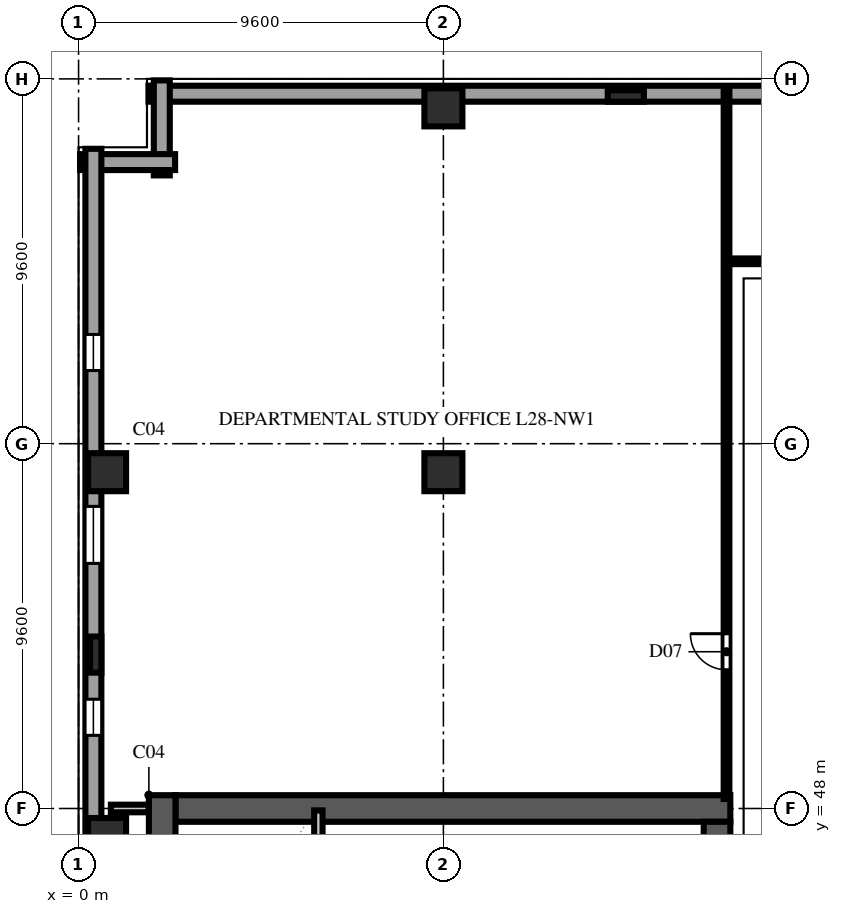
"""IFC4 building model, lengths in metres.
Left out: names, types, materials, properties, quantities, classifications, styles, units other than length and angle.
Written with IfcOpenShell. Run it as: python <this file> out.ifc"""

import sys

from ifc_helpers import new_model, si_unit, direction, frame, frame_2d, origin, origin_2d, place, context, subcontext, project, spatial, rectangle, extrude, element, fill, save


model = new_model("IFC4")
c1 = context("Model", 3, precision=1e-05, world=origin(), true_north=direction((0.0, 1.0)))
c2 = subcontext(c1, "Body", "Model", "MODEL_VIEW")
j1 = project(units=[si_unit("LENGTHUNIT", "METRE"), si_unit("PLANEANGLEUNIT", "RADIAN")], contexts=[c1])
p1 = place(None, origin())
s1 = spatial("IfcSite", under=j1, at=p1, CompositionType="ELEMENT")
p2 = place(p1, origin())
s2 = spatial("IfcBuilding", under=s1, at=p2, CompositionType="ELEMENT")
p3 = place(p2, frame((0.0, 0.0, 112.8)))
s3 = spatial("IfcBuildingStorey", under=s2, at=p3, CompositionType="ELEMENT", Elevation=112.8)
p4 = place(p3, frame((2.55, 48.0, 0.0), z_axis=(0.0, 0.0, 1.0), x_axis=(1.0, 0.0, 0.0)))
e1 = element("IfcWall", 1, at=p4, inside=s3, PredefinedType="SHEAR", context=c2, shape_type="SweptSolid", body=[
    extrude(rectangle(XDim=14.6, YDim=0.7, at=frame_2d((7.3, 0.0))), origin(), (0.0, 0.0, 1.0), 3.54),
])
p5 = place(p3, frame((2.2, 9.25, 0.0), z_axis=(0.0, 0.0, 1.0), x_axis=(0.0, 1.0, 0.0)))
e2 = element("IfcWall", 2, at=p5, inside=s3, PredefinedType="SHEAR", context=c2, shape_type="SweptSolid", body=[
    extrude(rectangle(XDim=39.1, YDim=0.7, at=frame_2d((19.55, 0.0))), origin(), (0.0, 0.0, 1.0), 3.54),
])
p6 = place(p3, frame((16.8, 36.4, 0.0), z_axis=(0.0, 0.0, 1.0), x_axis=(0.0, 1.0, 0.0)))
e3 = element("IfcWall", 3, at=p6, inside=s3, PredefinedType="SHEAR", context=c2, shape_type="SweptSolid", body=[
    extrude(rectangle(XDim=11.25, YDim=0.7, at=frame_2d((5.625, 0.0))), origin(), (0.0, 0.0, 1.0), 3.54),
])
p7 = place(p6, frame((9.2, 0.0, 0.0)))
e4 = element("IfcOpeningElement", 4, at=p7, cuts=e3, PredefinedType="OPENING", context=c2, shape_type="SweptSolid", body=[
    extrude(rectangle(XDim=0.95, YDim=2.15, at=frame_2d((0.475, 1.075))), frame((0.0, 0.362, 0.0), z_axis=(0.0, -1.0, 0.0), x_axis=(1.0, 0.0, 0.0)), (0.0, 0.0, 1.0), 0.724),
])
for number, where, z_axis, x_axis in (
    (5, (0.75, 47.25, 0.0), (0.0, 0.0, 1.0), (1.0, 0.0, 0.0)),
    (6, (0.75, 56.85, 0.0), (0.0, 0.0, 1.0), (1.0, 0.0, 0.0)),
    (7, (9.6, 56.85, 0.0), (0.0, 0.0, 1.0), (1.0, 0.0, 0.0)),
    (8, (9.6, 66.45, 0.0), (0.0, 0.0, 1.0), (1.0, 0.0, 0.0)),
):
    element("IfcColumn", number, at=place(p3, frame(where, z_axis=z_axis, x_axis=x_axis)), inside=s3, PredefinedType="COLUMN", context=c2, shape_type="SweptSolid", body=[
        extrude(rectangle(XDim=1.0, YDim=1.0, at=origin_2d()), origin(), (0.0, 0.0, 1.0), 3.8),
    ])
for number, where, z_axis, x_axis in (
    (9, (0.45, 52.05, 0.0), (0.0, 0.0, 1.0), (0.0, 1.0, 0.0)),
    (10, (14.4, 66.75, 0.0), (0.0, 0.0, 1.0), (1.0, 0.0, 0.0)),
):
    element("IfcColumn", number, at=place(p3, frame(where, z_axis=z_axis, x_axis=x_axis)), inside=s3, PredefinedType="PILASTER", context=c2, shape_type="SweptSolid", body=[
        extrude(rectangle(XDim=0.95, YDim=0.3, at=origin_2d()), origin(), (0.0, 0.0, 1.0), 3.8),
    ])
p8 = place(p3, frame((36.56, 66.81, 0.0), z_axis=(0.0, 0.0, 1.0), x_axis=(-1.0, 0.0, 0.0)))
e11 = element("IfcWall", 11, at=p8, inside=s3, PredefinedType="SOLIDWALL", context=c2, shape_type="SweptSolid", body=[
    extrude(rectangle(XDim=34.72, YDim=0.42, at=frame_2d((17.36, 0.0))), origin(), (0.0, 0.0, 1.0), 3.54),
])
p9 = place(p8, frame((4.885, 0.0, 0.9)))
e12 = element("IfcOpeningElement", 12, at=p9, cuts=e11, PredefinedType="OPENING", context=c2, shape_type="SweptSolid", body=[
    extrude(rectangle(XDim=0.95, YDim=1.85, at=frame_2d((0.475, 0.925))), frame((0.0, 0.222, 0.0), z_axis=(0.0, -1.0, 0.0), x_axis=(1.0, 0.0, 0.0)), (0.0, 0.0, 1.0), 0.444),
])
p10 = place(p8, frame((9.41, 0.0, 0.9)))
e13 = element("IfcOpeningElement", 13, at=p10, cuts=e11, PredefinedType="OPENING", context=c2, shape_type="SweptSolid", body=[
    extrude(rectangle(XDim=1.5, YDim=1.85, at=frame_2d((0.75, 0.925))), frame((0.0, 0.222, 0.0), z_axis=(0.0, -1.0, 0.0), x_axis=(1.0, 0.0, 0.0)), (0.0, 0.0, 1.0), 0.444),
])
p11 = place(p8, frame((14.485, 0.0, 0.9)))
e14 = element("IfcOpeningElement", 14, at=p11, cuts=e11, PredefinedType="OPENING", context=c2, shape_type="SweptSolid", body=[
    extrude(rectangle(XDim=0.95, YDim=1.85, at=frame_2d((0.475, 0.925))), frame((0.0, 0.222, 0.0), z_axis=(0.0, -1.0, 0.0), x_axis=(1.0, 0.0, 0.0)), (0.0, 0.0, 1.0), 0.444),
])
for number, where, z_axis, x_axis in (
    (15, (2.19, 67.16, 0.0), (0.0, 0.0, 1.0), (0.0, -1.0, 0.0)),
    (16, (2.54, 65.01, 0.0), (0.0, 0.0, 1.0), (-1.0, 0.0, 0.0)),
):
    element("IfcWall", number, at=place(p3, frame(where, z_axis=z_axis, x_axis=x_axis)), inside=s3, PredefinedType="SOLIDWALL", context=c2, shape_type="SweptSolid", body=[
        extrude(rectangle(XDim=2.5, YDim=0.42, at=frame_2d((1.25, 0.0))), origin(), (0.0, 0.0, 1.0), 3.54),
    ])
p12 = place(p3, frame((0.39, 65.36, 0.0), z_axis=(0.0, 0.0, 1.0), x_axis=(0.0, -1.0, 0.0)))
e17 = element("IfcWall", 17, at=p12, inside=s3, PredefinedType="SOLIDWALL", context=c2, shape_type="SweptSolid", body=[
    extrude(rectangle(XDim=63.52, YDim=0.42, at=frame_2d((31.76, 0.0))), origin(), (0.0, 0.0, 1.0), 3.54),
])
p13 = place(p12, frame((4.885, 0.0, 0.9)))
e18 = element("IfcOpeningElement", 18, at=p13, cuts=e17, PredefinedType="OPENING", context=c2, shape_type="SweptSolid", body=[
    extrude(rectangle(XDim=0.95, YDim=1.85, at=frame_2d((0.475, 0.925))), frame((0.0, 0.222, 0.0), z_axis=(0.0, -1.0, 0.0), x_axis=(1.0, 0.0, 0.0)), (0.0, 0.0, 1.0), 0.444),
])
p14 = place(p12, frame((9.41, 0.0, 0.9)))
e19 = element("IfcOpeningElement", 19, at=p14, cuts=e17, PredefinedType="OPENING", context=c2, shape_type="SweptSolid", body=[
    extrude(rectangle(XDim=1.5, YDim=1.85, at=frame_2d((0.75, 0.925))), frame((0.0, 0.222, 0.0), z_axis=(0.0, -1.0, 0.0), x_axis=(1.0, 0.0, 0.0)), (0.0, 0.0, 1.0), 0.444),
])
p15 = place(p12, frame((14.485, 0.0, 0.9)))
e20 = element("IfcOpeningElement", 20, at=p15, cuts=e17, PredefinedType="OPENING", context=c2, shape_type="SweptSolid", body=[
    extrude(rectangle(XDim=0.95, YDim=1.85, at=frame_2d((0.475, 0.925))), frame((0.0, 0.222, 0.0), z_axis=(0.0, -1.0, 0.0), x_axis=(1.0, 0.0, 0.0)), (0.0, 0.0, 1.0), 0.444),
])
p16 = place(p12, frame((19.01, 0.0, 0.9)))
e21 = element("IfcOpeningElement", 21, at=p16, cuts=e17, PredefinedType="OPENING", context=c2, shape_type="SweptSolid", body=[
    extrude(rectangle(XDim=1.5, YDim=1.85, at=frame_2d((0.75, 0.925))), frame((0.0, 0.222, 0.0), z_axis=(0.0, -1.0, 0.0), x_axis=(1.0, 0.0, 0.0)), (0.0, 0.0, 1.0), 0.444),
])
p17 = place(p12, frame((24.085, 0.0, 0.9)))
e22 = element("IfcOpeningElement", 22, at=p17, cuts=e17, PredefinedType="OPENING", context=c2, shape_type="SweptSolid", body=[
    extrude(rectangle(XDim=0.95, YDim=1.85, at=frame_2d((0.475, 0.925))), frame((0.0, 0.222, 0.0), z_axis=(0.0, -1.0, 0.0), x_axis=(1.0, 0.0, 0.0)), (0.0, 0.0, 1.0), 0.444),
])
p18 = place(p12, frame((28.61, 0.0, 0.9)))
e23 = element("IfcOpeningElement", 23, at=p18, cuts=e17, PredefinedType="OPENING", context=c2, shape_type="SweptSolid", body=[
    extrude(rectangle(XDim=1.5, YDim=1.85, at=frame_2d((0.75, 0.925))), frame((0.0, 0.222, 0.0), z_axis=(0.0, -1.0, 0.0), x_axis=(1.0, 0.0, 0.0)), (0.0, 0.0, 1.0), 0.444),
])
p19 = place(p12, frame((33.685, 0.0, 0.9)))
e24 = element("IfcOpeningElement", 24, at=p19, cuts=e17, PredefinedType="OPENING", context=c2, shape_type="SweptSolid", body=[
    extrude(rectangle(XDim=0.95, YDim=1.85, at=frame_2d((0.475, 0.925))), frame((0.0, 0.222, 0.0), z_axis=(0.0, -1.0, 0.0), x_axis=(1.0, 0.0, 0.0)), (0.0, 0.0, 1.0), 0.444),
])
p20 = place(p12, frame((38.21, 0.0, 0.9)))
e25 = element("IfcOpeningElement", 25, at=p20, cuts=e17, PredefinedType="OPENING", context=c2, shape_type="SweptSolid", body=[
    extrude(rectangle(XDim=1.5, YDim=1.85, at=frame_2d((0.75, 0.925))), frame((0.0, 0.222, 0.0), z_axis=(0.0, -1.0, 0.0), x_axis=(1.0, 0.0, 0.0)), (0.0, 0.0, 1.0), 0.444),
])
p21 = place(p12, frame((43.285, 0.0, 0.9)))
e26 = element("IfcOpeningElement", 26, at=p21, cuts=e17, PredefinedType="OPENING", context=c2, shape_type="SweptSolid", body=[
    extrude(rectangle(XDim=0.95, YDim=1.85, at=frame_2d((0.475, 0.925))), frame((0.0, 0.222, 0.0), z_axis=(0.0, -1.0, 0.0), x_axis=(1.0, 0.0, 0.0)), (0.0, 0.0, 1.0), 0.444),
])
p22 = place(p12, frame((47.81, 0.0, 0.9)))
e27 = element("IfcOpeningElement", 27, at=p22, cuts=e17, PredefinedType="OPENING", context=c2, shape_type="SweptSolid", body=[
    extrude(rectangle(XDim=1.5, YDim=1.85, at=frame_2d((0.75, 0.925))), frame((0.0, 0.222, 0.0), z_axis=(0.0, -1.0, 0.0), x_axis=(1.0, 0.0, 0.0)), (0.0, 0.0, 1.0), 0.444),
])
p23 = place(p12, frame((52.885, 0.0, 0.9)))
e28 = element("IfcOpeningElement", 28, at=p23, cuts=e17, PredefinedType="OPENING", context=c2, shape_type="SweptSolid", body=[
    extrude(rectangle(XDim=0.95, YDim=1.85, at=frame_2d((0.475, 0.925))), frame((0.0, 0.222, 0.0), z_axis=(0.0, -1.0, 0.0), x_axis=(1.0, 0.0, 0.0)), (0.0, 0.0, 1.0), 0.444),
])
p24 = place(p12, frame((57.41, 0.0, 0.9)))
e29 = element("IfcOpeningElement", 29, at=p24, cuts=e17, PredefinedType="OPENING", context=c2, shape_type="SweptSolid", body=[
    extrude(rectangle(XDim=1.5, YDim=1.85, at=frame_2d((0.75, 0.925))), frame((0.0, 0.222, 0.0), z_axis=(0.0, -1.0, 0.0), x_axis=(1.0, 0.0, 0.0)), (0.0, 0.0, 1.0), 0.444),
])
p25 = place(p3, frame((6.31, 40.14, 0.0), z_axis=(0.0, 0.0, 1.0), x_axis=(0.0, 1.0, 0.0)))
e30 = element("IfcWall", 30, at=p25, inside=s3, PredefinedType="SOLIDWALL", context=c2, shape_type="SweptSolid", body=[
    extrude(rectangle(XDim=7.81, YDim=0.22, at=frame_2d((3.905, 0.0))), origin(), (0.0, 0.0, 1.0), 3.54),
])
p26 = place(p3, frame((0.85, 48.0, 0.0), z_axis=(0.0, 0.0, 1.0), x_axis=(1.0, 0.0, 0.0)))
e31 = element("IfcWall", 31, at=p26, inside=s3, PredefinedType="SOLIDWALL", context=c2, shape_type="SweptSolid", body=[
    extrude(rectangle(XDim=0.995, YDim=0.2, at=frame_2d((0.498, 0.0))), origin(), (0.0, 0.0, 1.0), 3.54),
])
p27 = place(p3, frame((17.05, 62.4, 0.0), z_axis=(0.0, 0.0, 1.0), x_axis=(1.0, 0.0, 0.0)))
e32 = element("IfcWall", 32, at=p27, inside=s3, PredefinedType="PARTITIONING", context=c2, shape_type="SweptSolid", body=[
    extrude(rectangle(XDim=2.15, YDim=0.15, at=frame_2d((1.075, 0.0))), origin(), (0.0, 0.0, 1.0), 3.54),
])
p28 = place(p3, frame((17.05, 48.25, 0.0), z_axis=(0.0, 0.0, 1.0), x_axis=(0.0, 1.0, 0.0)))
e33 = element("IfcWall", 33, at=p28, inside=s3, PredefinedType="PARTITIONING", context=c2, shape_type="SweptSolid", body=[
    extrude(rectangle(XDim=18.73, YDim=0.15, at=frame_2d((9.365, 0.0))), origin(), (0.0, 0.0, 1.0), 3.54),
])
p29 = place(p28, frame((3.4, 0.0, 0.0)))
e34 = element("IfcOpeningElement", 34, at=p29, cuts=e33, PredefinedType="OPENING", context=c2, shape_type="SweptSolid", body=[
    extrude(rectangle(XDim=0.95, YDim=2.15, at=frame_2d((0.475, 1.075))), frame((0.0, 0.087, 0.0), z_axis=(0.0, -1.0, 0.0), x_axis=(1.0, 0.0, 0.0)), (0.0, 0.0, 1.0), 0.174),
])
p30 = place(p13, origin())
e35 = element("IfcWindow", 35, at=p30, inside=s3, PartitioningType="SINGLE_PANEL", PredefinedType="WINDOW", context=c2, shape_type="SweptSolid", body=[
    extrude(rectangle(XDim=0.95, YDim=1.85, at=frame_2d((0.475, 0.925))), frame((0.0, 0.11, 0.0), z_axis=(0.0, -1.0, 0.0), x_axis=(1.0, 0.0, 0.0)), (0.0, 0.0, 1.0), 0.06),
])
fill(e18, e35)
p31 = place(p14, origin())
e36 = element("IfcWindow", 36, at=p31, inside=s3, PartitioningType="DOUBLE_PANEL_VERTICAL", PredefinedType="WINDOW", context=c2, shape_type="SweptSolid", body=[
    extrude(rectangle(XDim=1.5, YDim=1.85, at=frame_2d((0.75, 0.925))), frame((0.0, 0.11, 0.0), z_axis=(0.0, -1.0, 0.0), x_axis=(1.0, 0.0, 0.0)), (0.0, 0.0, 1.0), 0.06),
])
fill(e19, e36)
p32 = place(p15, origin())
e37 = element("IfcWindow", 37, at=p32, inside=s3, PartitioningType="SINGLE_PANEL", PredefinedType="WINDOW", context=c2, shape_type="SweptSolid", body=[
    extrude(rectangle(XDim=0.95, YDim=1.85, at=frame_2d((0.475, 0.925))), frame((0.0, 0.11, 0.0), z_axis=(0.0, -1.0, 0.0), x_axis=(1.0, 0.0, 0.0)), (0.0, 0.0, 1.0), 0.06),
])
fill(e20, e37)
p33 = place(p29, origin())
e38 = element("IfcDoor", 38, at=p33, inside=s3, OperationType="SINGLE_SWING_RIGHT", PredefinedType="DOOR", context=c2, shape_type="SweptSolid", body=[
    extrude(rectangle(XDim=0.95, YDim=2.15, at=frame_2d((0.475, 1.075))), frame((0.0, 0.025, 0.0), z_axis=(0.0, -1.0, 0.0), x_axis=(1.0, 0.0, 0.0)), (0.0, 0.0, 1.0), 0.05),
])
fill(e34, e38)
save(model, sys.argv[1])
